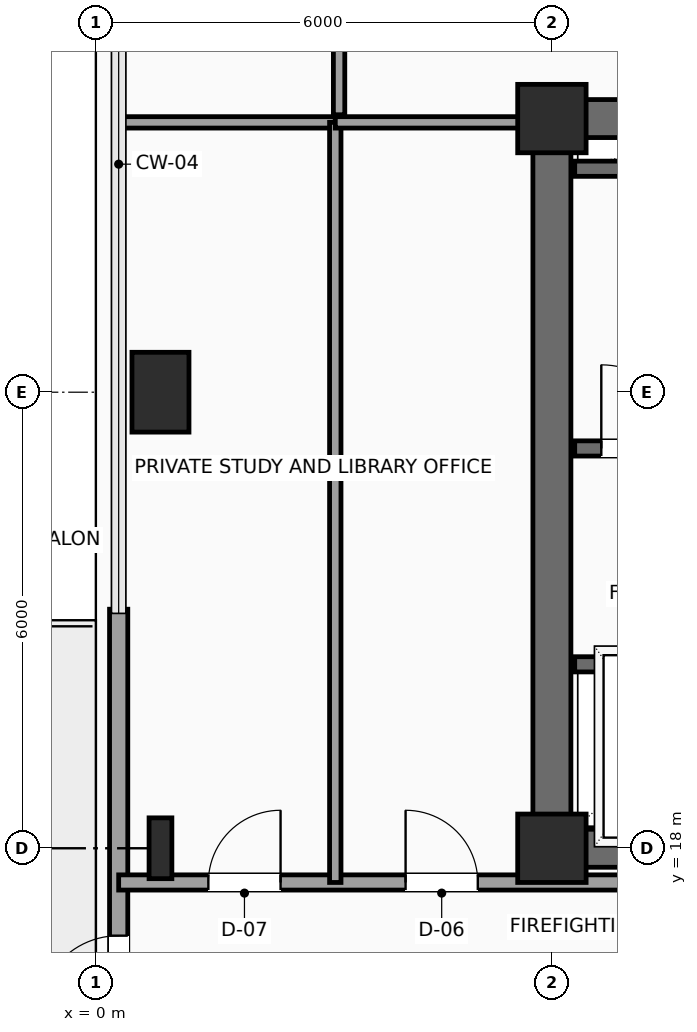
"""IFC4 building model, lengths in metres.
Left out: names, types, materials, properties, quantities, classifications, styles, units other than length and angle.
Written with IfcOpenShell. Run it as: python <this file> out.ifc"""

import sys

from ifc_helpers import new_model, si_unit, direction, frame, frame_2d, origin, origin_2d, place, context, subcontext, project, spatial, rectangle, i_section, extrude, element, fill, save


model = new_model("IFC4")
c1 = context("Model", 3, precision=1e-05, world=origin(), true_north=direction((0.0, 1.0)))
c2 = subcontext(c1, "Body", "Model", "MODEL_VIEW")
j1 = project(units=[si_unit("LENGTHUNIT", "METRE"), si_unit("PLANEANGLEUNIT", "RADIAN")], contexts=[c1])
p1 = place(None, origin())
s1 = spatial("IfcSite", under=j1, at=p1, CompositionType="ELEMENT")
p2 = place(p1, origin())
s2 = spatial("IfcBuilding", under=s1, at=p2, CompositionType="ELEMENT")
p3 = place(p2, frame((0.0, 0.0, 219.9)))
s3 = spatial("IfcBuildingStorey", under=s2, at=p3, CompositionType="ELEMENT", Elevation=219.9)
for number, where, z_axis, x_axis in (
    (1, (6.0, 18.0, 0.0), (0.0, 0.0, 1.0), (1.0, 0.0, 0.0)),
    (2, (6.0, 27.6, 0.0), (0.0, 0.0, 1.0), (1.0, 0.0, 0.0)),
):
    element("IfcColumn", number, at=place(p3, frame(where, z_axis=z_axis, x_axis=x_axis)), inside=s3, PredefinedType="COLUMN", context=c2, shape_type="SweptSolid", body=[
        extrude(rectangle(XDim=0.9, YDim=0.9, at=origin_2d()), origin(), (0.0, 0.0, 1.0), 3.75),
    ])
p4 = place(p3, frame((0.85, 18.0, 0.0), z_axis=(0.0, 0.0, 1.0), x_axis=(1.0, 0.0, 0.0)))
e3 = element("IfcColumn", 3, at=p4, inside=s3, PredefinedType="COLUMN", context=c2, shape_type="SweptSolid", body=[
    extrude(i_section(OverallWidth=0.3, OverallDepth=0.8, WebThickness=0.018, FlangeThickness=0.033, FilletRadius=0.03, at=origin_2d()), origin(), (0.0, 0.0, 1.0), 3.75),
])
p5 = place(p3, frame((0.85, 24.0, 0.0), z_axis=(0.0, 0.0, 1.0), x_axis=(1.0, 0.0, 0.0)))
e4 = element("IfcColumn", 4, at=p5, inside=s3, PredefinedType="COLUMN", context=c2, shape_type="SweptSolid", body=[
    extrude(rectangle(XDim=0.75, YDim=1.05, at=origin_2d()), origin(), (0.0, 0.0, 1.0), 3.75),
])
p6 = place(p3, frame((0.3, 11.855, 0.0), z_axis=(0.0, 0.0, 1.0), x_axis=(0.0, 1.0, 0.0)))
e5 = element("IfcWall", 5, at=p6, inside=s3, PredefinedType="SOLIDWALL", context=c2, shape_type="SweptSolid", body=[
    extrude(rectangle(XDim=9.29, YDim=0.24, at=frame_2d((4.645, 0.0))), origin(), (0.0, 0.0, 1.0), 3.54),
])
p7 = place(p6, frame((3.945, 0.0, 0.0)))
e6 = element("IfcOpeningElement", 6, at=p7, cuts=e5, PredefinedType="OPENING", context=c2, shape_type="SweptSolid", body=[
    extrude(rectangle(XDim=1.05, YDim=2.2, at=frame_2d((0.525, 1.1))), frame((0.0, 0.13, 0.0), z_axis=(0.0, -1.0, 0.0), x_axis=(1.0, 0.0, 0.0)), (0.0, 0.0, 1.0), 0.26),
])
p8 = place(p3, frame((6.0, 18.0, 0.0), z_axis=(0.0, 0.0, 1.0), x_axis=(1.0, 0.0, 0.0)))
e7 = element("IfcWall", 7, at=p8, inside=s3, PredefinedType="SHEAR", context=c2, shape_type="SweptSolid", body=[
    extrude(rectangle(XDim=12.0, YDim=0.5, at=frame_2d((6.0, 0.0))), origin(), (0.0, 0.0, 1.0), 3.54),
])
p9 = place(p8, frame((7.15, 0.0, 0.0)))
e8 = element("IfcOpeningElement", 8, at=p9, cuts=e7, PredefinedType="OPENING", context=c2, shape_type="SweptSolid", body=[
    extrude(rectangle(XDim=1.6, YDim=2.3, at=frame_2d((0.8, 1.15))), frame((0.0, 0.26, 0.0), z_axis=(0.0, -1.0, 0.0), x_axis=(1.0, 0.0, 0.0)), (0.0, 0.0, 1.0), 0.52),
])
p10 = place(p3, frame((6.0, 27.6, 0.0), z_axis=(0.0, 0.0, 1.0), x_axis=(1.0, 0.0, 0.0)))
e9 = element("IfcWall", 9, at=p10, inside=s3, PredefinedType="SHEAR", context=c2, shape_type="SweptSolid", body=[
    extrude(rectangle(XDim=12.0, YDim=0.5, at=frame_2d((6.0, 0.0))), origin(), (0.0, 0.0, 1.0), 3.54),
])
p11 = place(p10, frame((10.3, 0.0, 0.0)))
e10 = element("IfcOpeningElement", 10, at=p11, cuts=e9, PredefinedType="OPENING", context=c2, shape_type="SweptSolid", body=[
    extrude(rectangle(XDim=0.9, YDim=2.15, at=frame_2d((0.45, 1.075))), frame((0.0, 0.26, 0.0), z_axis=(0.0, -1.0, 0.0), x_axis=(1.0, 0.0, 0.0)), (0.0, 0.0, 1.0), 0.52),
])
p12 = place(p3, frame((6.0, 18.0, 0.0), z_axis=(0.0, 0.0, 1.0), x_axis=(0.0, 1.0, 0.0)))
e11 = element("IfcWall", 11, at=p12, inside=s3, PredefinedType="SHEAR", context=c2, shape_type="SweptSolid", body=[
    extrude(rectangle(XDim=9.6, YDim=0.5, at=frame_2d((4.8, 0.0))), origin(), (0.0, 0.0, 1.0), 3.54),
])
p13 = place(p3, frame((6.3, 23.26, 0.0), z_axis=(0.0, 0.0, 1.0), x_axis=(1.0, 0.0, 0.0)))
e12 = element("IfcWall", 12, at=p13, inside=s3, PredefinedType="SHEAR", context=c2, shape_type="SweptSolid", body=[
    extrude(rectangle(XDim=8.88, YDim=0.2, at=frame_2d((4.44, 0.0))), origin(), (0.0, 0.0, 1.0), 3.54),
])
p14 = place(p13, frame((0.35, 0.0, 0.0)))
e13 = element("IfcOpeningElement", 13, at=p14, cuts=e12, PredefinedType="OPENING", context=c2, shape_type="SweptSolid", body=[
    extrude(rectangle(XDim=1.1, YDim=2.2, at=frame_2d((0.55, 1.1))), frame((0.0, 0.11, 0.0), z_axis=(0.0, -1.0, 0.0), x_axis=(1.0, 0.0, 0.0)), (0.0, 0.0, 1.0), 0.22),
])
p15 = place(p3, frame((6.3, 26.94, 0.0), z_axis=(0.0, 0.0, 1.0), x_axis=(1.0, 0.0, 0.0)))
e14 = element("IfcWall", 14, at=p15, inside=s3, PredefinedType="SHEAR", context=c2, shape_type="SweptSolid", body=[
    extrude(rectangle(XDim=8.88, YDim=0.2, at=frame_2d((4.44, 0.0))), origin(), (0.0, 0.0, 1.0), 3.54),
])
p16 = place(p3, frame((6.3, 20.42, 0.0), z_axis=(0.0, 0.0, 1.0), x_axis=(1.0, 0.0, 0.0)))
e15 = element("IfcWall", 15, at=p16, inside=s3, PredefinedType="SHEAR", context=c2, shape_type="SweptSolid", body=[
    extrude(rectangle(XDim=4.95, YDim=0.2, at=frame_2d((2.475, 0.0))), origin(), (0.0, 0.0, 1.0), 3.54),
])
p17 = place(p16, frame((0.65, 0.0, 0.0)))
e16 = element("IfcOpeningElement", 16, at=p17, cuts=e15, PredefinedType="OPENING", context=c2, shape_type="SweptSolid", body=[
    extrude(rectangle(XDim=1.1, YDim=2.2, at=frame_2d((0.55, 1.1))), frame((0.0, 0.11, 0.0), z_axis=(0.0, -1.0, 0.0), x_axis=(1.0, 0.0, 0.0)), (0.0, 0.0, 1.0), 0.22),
])
p18 = place(p16, frame((3.05, 0.0, 0.0)))
e17 = element("IfcOpeningElement", 17, at=p18, cuts=e15, PredefinedType="OPENING", context=c2, shape_type="SweptSolid", body=[
    extrude(rectangle(XDim=1.1, YDim=2.2, at=frame_2d((0.55, 1.1))), frame((0.0, 0.11, 0.0), z_axis=(0.0, -1.0, 0.0), x_axis=(1.0, 0.0, 0.0)), (0.0, 0.0, 1.0), 0.22),
])
p19 = place(p3, frame((0.3, 17.55, 0.0), z_axis=(0.0, 0.0, 1.0), x_axis=(1.0, 0.0, 0.0)))
e18 = element("IfcWall", 18, at=p19, inside=s3, PredefinedType="SOLIDWALL", context=c2, shape_type="SweptSolid", body=[
    extrude(rectangle(XDim=12.3, YDim=0.2, at=frame_2d((6.15, 0.0))), origin(), (0.0, 0.0, 1.0), 3.54),
])
p20 = place(p19, frame((1.18, 0.0, 0.0)))
e19 = element("IfcOpeningElement", 19, at=p20, cuts=e18, PredefinedType="OPENING", context=c2, shape_type="SweptSolid", body=[
    extrude(rectangle(XDim=0.95, YDim=2.15, at=frame_2d((0.475, 1.075))), frame((0.0, 0.11, 0.0), z_axis=(0.0, -1.0, 0.0), x_axis=(1.0, 0.0, 0.0)), (0.0, 0.0, 1.0), 0.22),
])
p21 = place(p19, frame((3.775, 0.0, 0.0)))
e20 = element("IfcOpeningElement", 20, at=p21, cuts=e18, PredefinedType="OPENING", context=c2, shape_type="SweptSolid", body=[
    extrude(rectangle(XDim=0.95, YDim=2.15, at=frame_2d((0.475, 1.075))), frame((0.0, 0.11, 0.0), z_axis=(0.0, -1.0, 0.0), x_axis=(1.0, 0.0, 0.0)), (0.0, 0.0, 1.0), 0.22),
])
p22 = place(p3, frame((0.3, 27.55, 0.0), z_axis=(0.0, 0.0, 1.0), x_axis=(1.0, 0.0, 0.0)))
e21 = element("IfcWall", 21, at=p22, inside=s3, PredefinedType="PARTITIONING", context=c2, shape_type="SweptSolid", body=[
    extrude(rectangle(XDim=2.85, YDim=0.15, at=frame_2d((1.425, 0.0))), origin(), (0.0, 0.0, 1.0), 3.54),
])
p23 = place(p3, frame((3.15, 17.55, 0.0), z_axis=(0.0, 0.0, 1.0), x_axis=(0.0, 1.0, 0.0)))
e22 = element("IfcWall", 22, at=p23, inside=s3, PredefinedType="PARTITIONING", context=c2, shape_type="SweptSolid", body=[
    extrude(rectangle(XDim=10.0, YDim=0.15, at=frame_2d((5.0, 0.0))), origin(), (0.0, 0.0, 1.0), 3.54),
])
p24 = place(p3, frame((3.15, 27.55, 0.0), z_axis=(0.0, 0.0, 1.0), x_axis=(1.0, 0.0, 0.0)))
e23 = element("IfcWall", 23, at=p24, inside=s3, PredefinedType="PARTITIONING", context=c2, shape_type="SweptSolid", body=[
    extrude(rectangle(XDim=2.8, YDim=0.15, at=frame_2d((1.4, 0.0))), origin(), (0.0, 0.0, 1.0), 3.54),
])
p25 = place(p3, frame((3.2, 27.65, 0.0), z_axis=(0.0, 0.0, 1.0), x_axis=(0.0, 1.0, 0.0)))
e24 = element("IfcWall", 24, at=p25, inside=s3, PredefinedType="PARTITIONING", context=c2, shape_type="SweptSolid", body=[
    extrude(rectangle(XDim=3.55, YDim=0.15, at=frame_2d((1.775, 0.0))), origin(), (0.0, 0.0, 1.0), 3.54),
])
p26 = place(p7, origin())
e25 = element("IfcDoor", 25, at=p26, inside=s3, OperationType="SINGLE_SWING_LEFT", PredefinedType="DOOR", context=c2, shape_type="SweptSolid", body=[
    extrude(rectangle(XDim=1.05, YDim=2.2, at=frame_2d((0.525, 1.1))), frame((0.0, 0.025, 0.0), z_axis=(0.0, -1.0, 0.0), x_axis=(1.0, 0.0, 0.0)), (0.0, 0.0, 1.0), 0.05),
])
fill(e6, e25)
p27 = place(p14, origin())
e26 = element("IfcDoor", 26, at=p27, inside=s3, OperationType="SINGLE_SWING_LEFT", PredefinedType="DOOR", context=c2, shape_type="SweptSolid", body=[
    extrude(rectangle(XDim=1.1, YDim=2.2, at=frame_2d((0.55, 1.1))), frame((0.0, 0.025, 0.0), z_axis=(0.0, -1.0, 0.0), x_axis=(1.0, 0.0, 0.0)), (0.0, 0.0, 1.0), 0.05),
])
fill(e13, e26)
p28 = place(p20, origin())
e27 = element("IfcDoor", 27, at=p28, inside=s3, OperationType="SINGLE_SWING_RIGHT", PredefinedType="DOOR", context=c2, shape_type="SweptSolid", body=[
    extrude(rectangle(XDim=0.95, YDim=2.15, at=frame_2d((0.475, 1.075))), frame((0.0, 0.025, 0.0), z_axis=(0.0, -1.0, 0.0), x_axis=(1.0, 0.0, 0.0)), (0.0, 0.0, 1.0), 0.05),
])
fill(e19, e27)
p29 = place(p21, origin())
e28 = element("IfcDoor", 28, at=p29, inside=s3, OperationType="SINGLE_SWING_LEFT", PredefinedType="DOOR", context=c2, shape_type="SweptSolid", body=[
    extrude(rectangle(XDim=0.95, YDim=2.15, at=frame_2d((0.475, 1.075))), frame((0.0, 0.025, 0.0), z_axis=(0.0, -1.0, 0.0), x_axis=(1.0, 0.0, 0.0)), (0.0, 0.0, 1.0), 0.05),
])
fill(e20, e28)
save(model, sys.argv[1])
